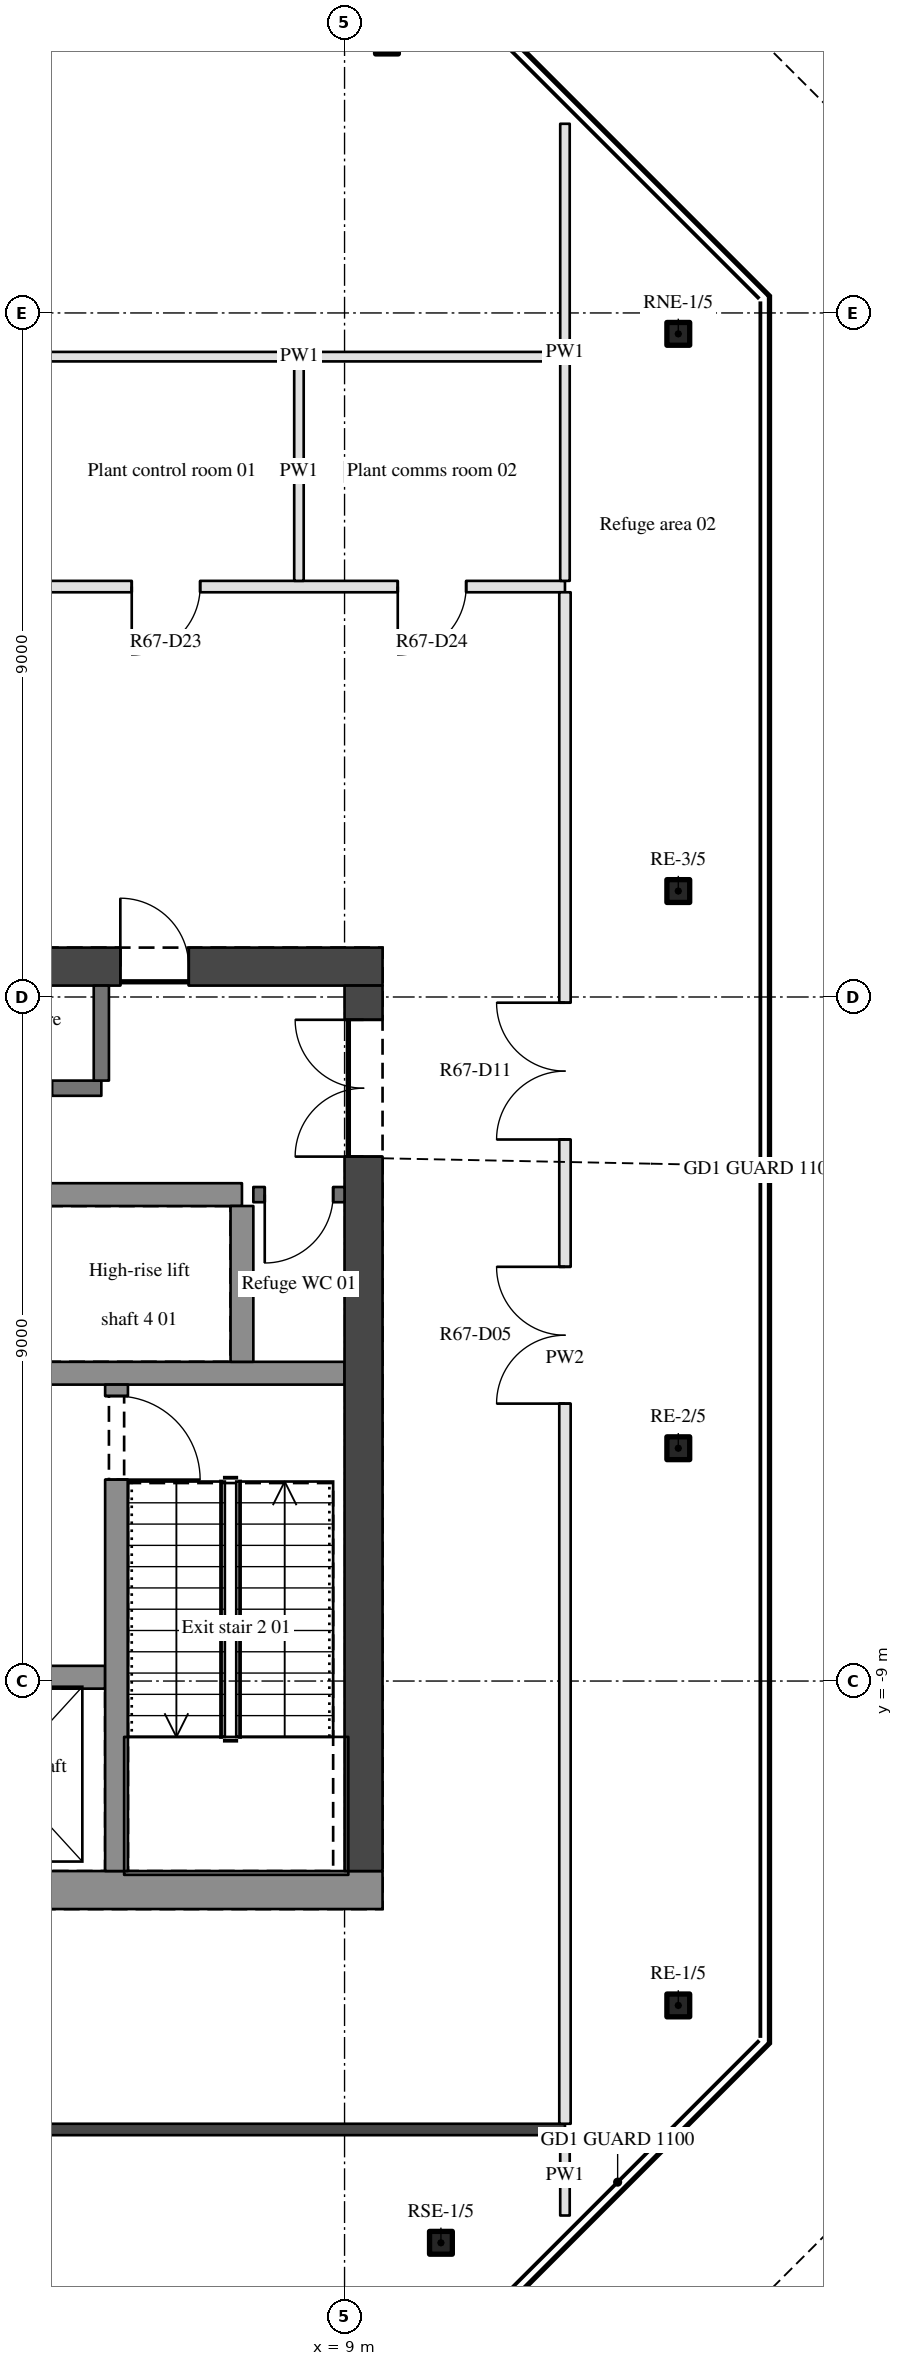
"""IFC4 building model, lengths in metres.
Left out: names, types, materials, properties, quantities, classifications, styles, units other than length and angle.
Written with IfcOpenShell. Run it as: python <this file> out.ifc"""

import sys

from ifc_helpers import new_model, si_unit, direction, frame, frame_2d, origin, origin_2d, place, context, subcontext, project, spatial, rectangle, hollow_rectangle, extrude, element, fill, save


model = new_model("IFC4")
c1 = context("Model", 3, precision=1e-05, world=origin(), true_north=direction((0.0, 1.0)))
c2 = subcontext(c1, "Body", "Model", "MODEL_VIEW")
j1 = project(units=[si_unit("LENGTHUNIT", "METRE"), si_unit("PLANEANGLEUNIT", "RADIAN")], contexts=[c1])
p1 = place(None, origin())
s1 = spatial("IfcSite", under=j1, at=p1, CompositionType="ELEMENT")
p2 = place(p1, origin())
s2 = spatial("IfcBuilding", under=s1, at=p2, CompositionType="ELEMENT")
p3 = place(p2, frame((0.0, 0.0, 255.0)))
s3 = spatial("IfcBuildingStorey", under=s2, at=p3, CompositionType="ELEMENT", Elevation=255.0)
for number, where, z_axis, x_axis in (
    (1, (10.268, -16.391, 0.0), (0.0, 0.0, 1.0), (1.0, 0.0, 0.0)),
    (2, (13.391, -13.268, 0.0), (0.0, 0.0, 1.0), (1.0, 0.0, 0.0)),
    (3, (13.391, -5.937, 0.0), (0.0, 0.0, 1.0), (1.0, 0.0, 0.0)),
    (4, (13.391, 1.394, 0.0), (0.0, 0.0, 1.0), (1.0, 0.0, 0.0)),
    (5, (13.391, 8.725, 0.0), (0.0, 0.0, 1.0), (1.0, 0.0, 0.0)),
    (6, (9.558, 12.558, 0.0), (0.0, 0.0, 1.0), (1.0, 0.0, 0.0)),
):
    element("IfcColumn", number, at=place(p3, frame(where, z_axis=z_axis, x_axis=x_axis)), inside=s3, PredefinedType="COLUMN", context=c2, shape_type="SweptSolid", body=[
        extrude(hollow_rectangle(XDim=0.3, YDim=0.3, WallThickness=0.02, InnerFilletRadius=0.03, OuterFilletRadius=0.05, at=origin_2d()), origin(), (0.0, 0.0, 1.0), 4.08),
    ])
p4 = place(p3, frame((-9.5, -11.75, 0.0), z_axis=(0.0, 0.0, 1.0), x_axis=(1.0, 0.0, 0.0)))
e7 = element("IfcWall", 7, at=p4, inside=s3, PredefinedType="SHEAR", context=c2, shape_type="SweptSolid", body=[
    extrude(rectangle(XDim=19.0, YDim=0.5, at=frame_2d((9.5, 0.0))), origin(), (0.0, 0.0, 1.0), 4.5),
])
p5 = place(p3, frame((-9.5, 0.4, 0.0), z_axis=(0.0, 0.0, 1.0), x_axis=(1.0, 0.0, 0.0)))
e8 = element("IfcWall", 8, at=p5, inside=s3, PredefinedType="SHEAR", context=c2, shape_type="SweptSolid", body=[
    extrude(rectangle(XDim=19.0, YDim=0.5, at=frame_2d((9.5, 0.0))), origin(), (0.0, 0.0, 1.0), 4.5),
])
p6 = place(p5, frame((8.6, 0.0, 0.0)))
e9 = element("IfcOpeningElement", 9, at=p6, cuts=e8, PredefinedType="OPENING", context=c2, shape_type="SweptSolid", body=[
    extrude(rectangle(XDim=1.8, YDim=2.1, at=frame_2d((0.9, 1.05))), frame((0.0, 0.26, 0.0), z_axis=(0.0, -1.0, 0.0), x_axis=(1.0, 0.0, 0.0)), (0.0, 0.0, 1.0), 0.52),
])
p7 = place(p5, frame((2.55, 0.0, 0.0)))
e10 = element("IfcOpeningElement", 10, at=p7, cuts=e8, PredefinedType="OPENING", context=c2, shape_type="SweptSolid", body=[
    extrude(rectangle(XDim=0.9, YDim=2.1, at=frame_2d((0.45, 1.05))), frame((0.0, 0.26, 0.0), z_axis=(0.0, -1.0, 0.0), x_axis=(1.0, 0.0, 0.0)), (0.0, 0.0, 1.0), 0.52),
])
p8 = place(p5, frame((15.55, 0.0, 0.0)))
e11 = element("IfcOpeningElement", 11, at=p8, cuts=e8, PredefinedType="OPENING", context=c2, shape_type="SweptSolid", body=[
    extrude(rectangle(XDim=0.9, YDim=2.1, at=frame_2d((0.45, 1.05))), frame((0.0, 0.26, 0.0), z_axis=(0.0, -1.0, 0.0), x_axis=(1.0, 0.0, 0.0)), (0.0, 0.0, 1.0), 0.52),
])
p9 = place(p3, frame((9.25, -11.5, 0.0), z_axis=(0.0, 0.0, 1.0), x_axis=(0.0, 1.0, 0.0)))
e12 = element("IfcWall", 12, at=p9, inside=s3, PredefinedType="SHEAR", context=c2, shape_type="SweptSolid", body=[
    extrude(rectangle(XDim=11.65, YDim=0.5, at=frame_2d((5.825, 0.0))), origin(), (0.0, 0.0, 1.0), 4.5),
])
p10 = place(p9, frame((9.4, 0.0, 0.0)))
e13 = element("IfcOpeningElement", 13, at=p10, cuts=e12, PredefinedType="OPENING", context=c2, shape_type="SweptSolid", body=[
    extrude(rectangle(XDim=1.8, YDim=2.1, at=frame_2d((0.9, 1.05))), frame((0.0, 0.26, 0.0), z_axis=(0.0, -1.0, 0.0), x_axis=(1.0, 0.0, 0.0)), (0.0, 0.0, 1.0), 0.52),
])
p11 = place(p3, frame((-11.9, -14.9, 0.0), z_axis=(0.0, 0.0, 1.0), x_axis=(1.0, 0.0, 0.0)))
e14 = element("IfcWall", 14, at=p11, inside=s3, PredefinedType="PARTITIONING", context=c2, shape_type="SweptSolid", body=[
    extrude(rectangle(XDim=23.8, YDim=0.15, at=frame_2d((11.9, 0.0))), origin(), (0.0, 0.0, 1.0), 3.08),
])
p12 = place(p11, frame((11.0, 0.0, 0.0)))
e15 = element("IfcOpeningElement", 15, at=p12, cuts=e14, PredefinedType="OPENING", context=c2, shape_type="SweptSolid", body=[
    extrude(rectangle(XDim=1.8, YDim=2.1, at=frame_2d((0.9, 1.05))), frame((0.0, 0.085, 0.0), z_axis=(0.0, -1.0, 0.0), x_axis=(1.0, 0.0, 0.0)), (0.0, 0.0, 1.0), 0.17),
])
p13 = place(p11, frame((8.9, 0.0, 0.0)))
e16 = element("IfcOpeningElement", 16, at=p13, cuts=e14, PredefinedType="OPENING", context=c2, shape_type="SweptSolid", body=[
    extrude(rectangle(XDim=1.8, YDim=2.1, at=frame_2d((0.9, 1.05))), frame((0.0, 0.085, 0.0), z_axis=(0.0, -1.0, 0.0), x_axis=(1.0, 0.0, 0.0)), (0.0, 0.0, 1.0), 0.17),
])
p14 = place(p3, frame((-5.85, -8.95, 0.0), z_axis=(0.0, 0.0, 1.0), x_axis=(1.0, 0.0, 0.0)))
e17 = element("IfcWall", 17, at=p14, inside=s3, PredefinedType="SHEAR", context=c2, shape_type="SweptSolid", body=[
    extrude(rectangle(XDim=11.7, YDim=0.3, at=frame_2d((5.85, 0.0))), origin(), (0.0, 0.0, 1.0), 4.5),
])
p15 = place(p14, frame((0.8, 0.0, 0.0)))
e18 = element("IfcOpeningElement", 18, at=p15, cuts=e17, PredefinedType="OPENING", context=c2, shape_type="SweptSolid", body=[
    extrude(rectangle(XDim=1.1, YDim=2.1, at=frame_2d((0.55, 1.05))), frame((0.0, 0.16, 0.0), z_axis=(0.0, -1.0, 0.0), x_axis=(1.0, 0.0, 0.0)), (0.0, 0.0, 1.0), 0.32),
])
p16 = place(p14, frame((3.8, 0.0, 0.0)))
e19 = element("IfcOpeningElement", 19, at=p16, cuts=e17, PredefinedType="OPENING", context=c2, shape_type="SweptSolid", body=[
    extrude(rectangle(XDim=1.1, YDim=2.1, at=frame_2d((0.55, 1.05))), frame((0.0, 0.16, 0.0), z_axis=(0.0, -1.0, 0.0), x_axis=(1.0, 0.0, 0.0)), (0.0, 0.0, 1.0), 0.32),
])
p17 = place(p14, frame((6.8, 0.0, 0.0)))
e20 = element("IfcOpeningElement", 20, at=p17, cuts=e17, PredefinedType="OPENING", context=c2, shape_type="SweptSolid", body=[
    extrude(rectangle(XDim=1.1, YDim=2.1, at=frame_2d((0.55, 1.05))), frame((0.0, 0.16, 0.0), z_axis=(0.0, -1.0, 0.0), x_axis=(1.0, 0.0, 0.0)), (0.0, 0.0, 1.0), 0.32),
])
p18 = place(p14, frame((9.8, 0.0, 0.0)))
e21 = element("IfcOpeningElement", 21, at=p18, cuts=e17, PredefinedType="OPENING", context=c2, shape_type="SweptSolid", body=[
    extrude(rectangle(XDim=1.1, YDim=2.1, at=frame_2d((0.55, 1.05))), frame((0.0, 0.16, 0.0), z_axis=(0.0, -1.0, 0.0), x_axis=(1.0, 0.0, 0.0)), (0.0, 0.0, 1.0), 0.32),
])
p19 = place(p3, frame((2.25, -4.95, 0.0), z_axis=(0.0, 0.0, 1.0), x_axis=(1.0, 0.0, 0.0)))
e22 = element("IfcWall", 22, at=p19, inside=s3, PredefinedType="SHEAR", context=c2, shape_type="SweptSolid", body=[
    extrude(rectangle(XDim=6.75, YDim=0.3, at=frame_2d((3.375, 0.0))), origin(), (0.0, 0.0, 1.0), 4.5),
])
p20 = place(p3, frame((2.25, -2.6, 0.0), z_axis=(0.0, 0.0, 1.0), x_axis=(1.0, 0.0, 0.0)))
e23 = element("IfcWall", 23, at=p20, inside=s3, PredefinedType="SHEAR", context=c2, shape_type="SweptSolid", body=[
    extrude(rectangle(XDim=5.4, YDim=0.3, at=frame_2d((2.7, 0.0))), origin(), (0.0, 0.0, 1.0), 4.5),
])
p21 = place(p3, frame((9.0, -2.6, 0.0), z_axis=(0.0, 0.0, 1.0), x_axis=(-1.0, 0.0, 0.0)))
e24 = element("IfcWall", 24, at=p21, inside=s3, PredefinedType="SOLIDWALL", context=c2, shape_type="SweptSolid", body=[
    extrude(rectangle(XDim=1.2, YDim=0.2, at=frame_2d((0.6, 0.0))), origin(), (0.0, 0.0, 1.0), 4.2),
])
p22 = place(p21, frame((0.15, 0.0, 0.0)))
e25 = element("IfcOpeningElement", 25, at=p22, cuts=e24, PredefinedType="OPENING", context=c2, shape_type="SweptSolid", body=[
    extrude(rectangle(XDim=0.9, YDim=2.1, at=frame_2d((0.45, 1.05))), frame((0.0, 0.11, 0.0), z_axis=(0.0, -1.0, 0.0), x_axis=(1.0, 0.0, 0.0)), (0.0, 0.0, 1.0), 0.22),
])
p23 = place(p3, frame((3.6, -1.2, 0.0), z_axis=(0.0, 0.0, 1.0), x_axis=(1.0, 0.0, 0.0)))
e26 = element("IfcWall", 26, at=p23, inside=s3, PredefinedType="SOLIDWALL", context=c2, shape_type="SweptSolid", body=[
    extrude(rectangle(XDim=2.2, YDim=0.2, at=frame_2d((1.1, 0.0))), origin(), (0.0, 0.0, 1.0), 4.2),
])
p24 = place(p23, frame((0.65, 0.0, 0.0)))
e27 = element("IfcOpeningElement", 27, at=p24, cuts=e26, PredefinedType="OPENING", context=c2, shape_type="SweptSolid", body=[
    extrude(rectangle(XDim=0.9, YDim=2.1, at=frame_2d((0.45, 1.05))), frame((0.0, 0.11, 0.0), z_axis=(0.0, -1.0, 0.0), x_axis=(1.0, 0.0, 0.0)), (0.0, 0.0, 1.0), 0.22),
])
p25 = place(p3, frame((11.9, 5.4, 0.0), z_axis=(0.0, 0.0, 1.0), x_axis=(-1.0, 0.0, 0.0)))
e28 = element("IfcWall", 28, at=p25, inside=s3, PredefinedType="PARTITIONING", context=c2, shape_type="SweptSolid", body=[
    extrude(rectangle(XDim=12.45, YDim=0.15, at=frame_2d((6.225, 0.0))), origin(), (0.0, 0.0, 1.0), 3.56),
])
p26 = place(p25, frame((8.25, 0.0, 0.0)))
e29 = element("IfcOpeningElement", 29, at=p26, cuts=e28, PredefinedType="OPENING", context=c2, shape_type="SweptSolid", body=[
    extrude(rectangle(XDim=1.0, YDim=2.1, at=frame_2d((0.5, 1.05))), frame((0.0, 0.085, 0.0), z_axis=(0.0, -1.0, 0.0), x_axis=(1.0, 0.0, 0.0)), (0.0, 0.0, 1.0), 0.17),
])
p27 = place(p25, frame((10.975, 0.0, 0.0)))
e30 = element("IfcOpeningElement", 30, at=p27, cuts=e28, PredefinedType="OPENING", context=c2, shape_type="SweptSolid", body=[
    extrude(rectangle(XDim=1.0, YDim=2.1, at=frame_2d((0.5, 1.05))), frame((0.0, 0.085, 0.0), z_axis=(0.0, -1.0, 0.0), x_axis=(1.0, 0.0, 0.0)), (0.0, 0.0, 1.0), 0.17),
])
p28 = place(p25, frame((4.8, 0.0, 0.0)))
e31 = element("IfcOpeningElement", 31, at=p28, cuts=e28, PredefinedType="OPENING", context=c2, shape_type="SweptSolid", body=[
    extrude(rectangle(XDim=0.9, YDim=2.1, at=frame_2d((0.45, 1.05))), frame((0.0, 0.085, 0.0), z_axis=(0.0, -1.0, 0.0), x_axis=(1.0, 0.0, 0.0)), (0.0, 0.0, 1.0), 0.17),
])
p29 = place(p25, frame((1.3, 0.0, 0.0)))
e32 = element("IfcOpeningElement", 32, at=p29, cuts=e28, PredefinedType="OPENING", context=c2, shape_type="SweptSolid", body=[
    extrude(rectangle(XDim=0.9, YDim=2.1, at=frame_2d((0.45, 1.05))), frame((0.0, 0.085, 0.0), z_axis=(0.0, -1.0, 0.0), x_axis=(1.0, 0.0, 0.0)), (0.0, 0.0, 1.0), 0.17),
])
p30 = place(p3, frame((4.975, 8.425, 0.0), z_axis=(0.0, 0.0, 1.0), x_axis=(1.0, 0.0, 0.0)))
e33 = element("IfcWall", 33, at=p30, inside=s3, PredefinedType="PARTITIONING", context=c2, shape_type="SweptSolid", body=[
    extrude(rectangle(XDim=6.862, YDim=0.125, at=frame_2d((3.431, 0.0))), origin(), (0.0, 0.0, 1.0), 3.56),
])
p31 = place(p3, frame((5.8, -1.1, 0.0), z_axis=(0.0, 0.0, 1.0), x_axis=(0.0, 1.0, 0.0)))
e34 = element("IfcWall", 34, at=p31, inside=s3, PredefinedType="SOLIDWALL", context=c2, shape_type="SweptSolid", body=[
    extrude(rectangle(XDim=1.25, YDim=0.2, at=frame_2d((0.625, 0.0))), origin(), (0.0, 0.0, 1.0), 4.2),
])
p32 = place(p3, frame((6.0, -5.1, 0.0), z_axis=(0.0, 0.0, 1.0), x_axis=(0.0, -1.0, 0.0)))
e35 = element("IfcWall", 35, at=p32, inside=s3, PredefinedType="SHEAR", context=c2, shape_type="SweptSolid", body=[
    extrude(rectangle(XDim=6.4, YDim=0.3, at=frame_2d((3.2, 0.0))), origin(), (0.0, 0.0, 1.0), 4.5),
])
p33 = place(p32, frame((0.15, 0.0, 0.0)))
e36 = element("IfcOpeningElement", 36, at=p33, cuts=e35, PredefinedType="OPENING", context=c2, shape_type="SweptSolid", body=[
    extrude(rectangle(XDim=1.1, YDim=2.1, at=frame_2d((0.55, 1.05))), frame((0.0, 0.16, 0.0), z_axis=(0.0, -1.0, 0.0), x_axis=(1.0, 0.0, 0.0)), (0.0, 0.0, 1.0), 0.32),
])
p34 = place(p3, frame((7.65, -4.8, 0.0), z_axis=(0.0, 0.0, 1.0), x_axis=(0.0, 1.0, 0.0)))
e37 = element("IfcWall", 37, at=p34, inside=s3, PredefinedType="SHEAR", context=c2, shape_type="SweptSolid", body=[
    extrude(rectangle(XDim=2.05, YDim=0.3, at=frame_2d((1.025, 0.0))), origin(), (0.0, 0.0, 1.0), 4.5),
])
p35 = place(p3, frame((8.4, 5.475, 0.0), z_axis=(0.0, 0.0, 1.0), x_axis=(0.0, 1.0, 0.0)))
e38 = element("IfcWall", 38, at=p35, inside=s3, PredefinedType="PARTITIONING", context=c2, shape_type="SweptSolid", body=[
    extrude(rectangle(XDim=2.887, YDim=0.125, at=frame_2d((1.444, 0.0))), origin(), (0.0, 0.0, 1.0), 3.56),
])
p36 = place(p3, frame((11.9, -16.032, 0.0), z_axis=(0.0, 0.0, 1.0), x_axis=(0.0, 1.0, 0.0)))
e39 = element("IfcWall", 39, at=p36, inside=s3, PredefinedType="PARTITIONING", context=c2, shape_type="SweptSolid", body=[
    extrude(rectangle(XDim=1.057, YDim=0.125, at=frame_2d((0.528, 0.0))), origin(), (0.0, 0.0, 1.0), 3.56),
])
p37 = place(p3, frame((11.9, -14.825, 0.0), z_axis=(0.0, 0.0, 1.0), x_axis=(0.0, 1.0, 0.0)))
e40 = element("IfcWall", 40, at=p37, inside=s3, PredefinedType="PARTITIONING", context=c2, shape_type="SweptSolid", body=[
    extrude(rectangle(XDim=20.15, YDim=0.15, at=frame_2d((10.075, 0.0))), origin(), (0.0, 0.0, 1.0), 3.56),
])
p38 = place(p37, frame((9.475, 0.0, 0.0)))
e41 = element("IfcOpeningElement", 41, at=p38, cuts=e40, PredefinedType="OPENING", context=c2, shape_type="SweptSolid", body=[
    extrude(rectangle(XDim=1.8, YDim=2.1, at=frame_2d((0.9, 1.05))), frame((0.0, 0.085, 0.0), z_axis=(0.0, -1.0, 0.0), x_axis=(1.0, 0.0, 0.0)), (0.0, 0.0, 1.0), 0.17),
])
p39 = place(p37, frame((12.95, 0.0, 0.0)))
e42 = element("IfcOpeningElement", 42, at=p39, cuts=e40, PredefinedType="OPENING", context=c2, shape_type="SweptSolid", body=[
    extrude(rectangle(XDim=1.8, YDim=2.1, at=frame_2d((0.9, 1.05))), frame((0.0, 0.085, 0.0), z_axis=(0.0, -1.0, 0.0), x_axis=(1.0, 0.0, 0.0)), (0.0, 0.0, 1.0), 0.17),
])
p40 = place(p3, frame((11.9, 5.475, 0.0), z_axis=(0.0, 0.0, 1.0), x_axis=(0.0, 1.0, 0.0)))
e43 = element("IfcWall", 43, at=p40, inside=s3, PredefinedType="PARTITIONING", context=c2, shape_type="SweptSolid", body=[
    extrude(rectangle(XDim=6.014, YDim=0.125, at=frame_2d((3.007, 0.0))), origin(), (0.0, 0.0, 1.0), 3.56),
])
p41 = place(p38, origin())
e44 = element("IfcDoor", 44, at=p41, inside=s3, OperationType="DOUBLE_DOOR_SINGLE_SWING", PredefinedType="DOOR", context=c2, shape_type="SweptSolid", body=[
    extrude(rectangle(XDim=1.8, YDim=2.1, at=frame_2d((0.9, 1.05))), frame((0.0, 0.025, 0.0), z_axis=(0.0, -1.0, 0.0), x_axis=(1.0, 0.0, 0.0)), (0.0, 0.0, 1.0), 0.05),
])
fill(e41, e44)
p42 = place(p33, origin())
e45 = element("IfcDoor", 45, at=p42, inside=s3, OperationType="SINGLE_SWING_RIGHT", PredefinedType="DOOR", context=c2, shape_type="SweptSolid", body=[
    extrude(rectangle(XDim=1.1, YDim=2.1, at=frame_2d((0.55, 1.05))), frame((0.0, 0.025, 0.0), z_axis=(0.0, -1.0, 0.0), x_axis=(1.0, 0.0, 0.0)), (0.0, 0.0, 1.0), 0.05),
])
fill(e36, e45)
p43 = place(p22, origin())
e46 = element("IfcDoor", 46, at=p43, inside=s3, OperationType="SINGLE_SWING_RIGHT", PredefinedType="DOOR", context=c2, shape_type="SweptSolid", body=[
    extrude(rectangle(XDim=0.9, YDim=2.1, at=frame_2d((0.45, 1.05))), frame((0.0, 0.025, 0.0), z_axis=(0.0, -1.0, 0.0), x_axis=(1.0, 0.0, 0.0)), (0.0, 0.0, 1.0), 0.05),
])
fill(e25, e46)
p44 = place(p8, origin())
e47 = element("IfcDoor", 47, at=p44, inside=s3, OperationType="SINGLE_SWING_LEFT", PredefinedType="DOOR", context=c2, shape_type="SweptSolid", body=[
    extrude(rectangle(XDim=0.9, YDim=2.1, at=frame_2d((0.45, 1.05))), frame((0.0, 0.025, 0.0), z_axis=(0.0, -1.0, 0.0), x_axis=(1.0, 0.0, 0.0)), (0.0, 0.0, 1.0), 0.05),
])
fill(e11, e47)
p45 = place(p28, origin())
e48 = element("IfcDoor", 48, at=p45, inside=s3, OperationType="SINGLE_SWING_RIGHT", PredefinedType="DOOR", context=c2, shape_type="SweptSolid", body=[
    extrude(rectangle(XDim=0.9, YDim=2.1, at=frame_2d((0.45, 1.05))), frame((0.0, 0.025, 0.0), z_axis=(0.0, -1.0, 0.0), x_axis=(1.0, 0.0, 0.0)), (0.0, 0.0, 1.0), 0.05),
])
fill(e31, e48)
p46 = place(p29, origin())
e49 = element("IfcDoor", 49, at=p46, inside=s3, OperationType="SINGLE_SWING_RIGHT", PredefinedType="DOOR", context=c2, shape_type="SweptSolid", body=[
    extrude(rectangle(XDim=0.9, YDim=2.1, at=frame_2d((0.45, 1.05))), frame((0.0, 0.025, 0.0), z_axis=(0.0, -1.0, 0.0), x_axis=(1.0, 0.0, 0.0)), (0.0, 0.0, 1.0), 0.05),
])
fill(e32, e49)
p47 = place(p39, origin())
e50 = element("IfcDoor", 50, at=p47, inside=s3, OperationType="DOUBLE_DOOR_SINGLE_SWING", PredefinedType="DOOR", context=c2, shape_type="SweptSolid", body=[
    extrude(rectangle(XDim=1.8, YDim=2.1, at=frame_2d((0.9, 1.05))), frame((0.0, 0.025, 0.0), z_axis=(0.0, -1.0, 0.0), x_axis=(1.0, 0.0, 0.0)), (0.0, 0.0, 1.0), 0.05),
])
fill(e42, e50)
p48 = place(p10, origin())
e51 = element("IfcDoor", 51, at=p48, inside=s3, OperationType="DOUBLE_DOOR_SINGLE_SWING", PredefinedType="DOOR", context=c2, shape_type="SweptSolid", body=[
    extrude(rectangle(XDim=1.8, YDim=2.1, at=frame_2d((0.9, 1.05))), frame((0.0, 0.025, 0.0), z_axis=(0.0, -1.0, 0.0), x_axis=(1.0, 0.0, 0.0)), (0.0, 0.0, 1.0), 0.05),
])
fill(e13, e51)
save(model, sys.argv[1])
